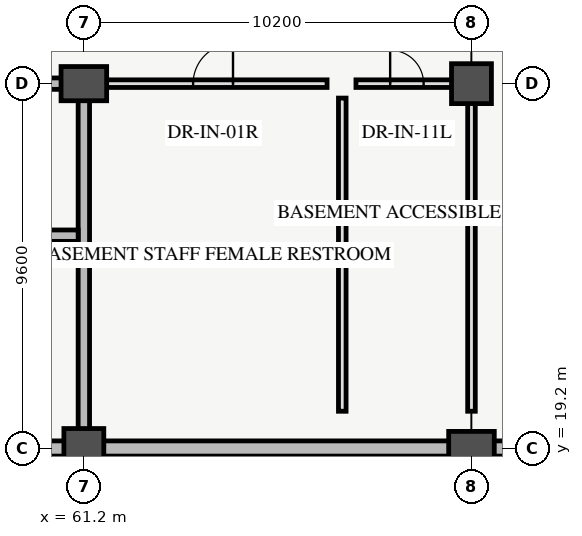
"""IFC4 building model, lengths in metres.
Left out: names, types, materials, properties, quantities, classifications, styles, units other than length and angle.
Written with IfcOpenShell. Run it as: python <this file> out.ifc"""

import sys

from ifc_helpers import new_model, si_unit, direction, frame, frame_2d, origin, origin_2d, place, context, subcontext, project, spatial, rectangle, extrude, element, fill, save


model = new_model("IFC4")
c1 = context("Model", 3, precision=1e-05, world=origin(), true_north=direction((0.0, 1.0)))
c2 = subcontext(c1, "Body", "Model", "MODEL_VIEW")
j1 = project(units=[si_unit("LENGTHUNIT", "METRE"), si_unit("PLANEANGLEUNIT", "RADIAN")], contexts=[c1])
p1 = place(None, origin())
s1 = spatial("IfcSite", under=j1, at=p1, CompositionType="ELEMENT")
p2 = place(p1, origin())
s2 = spatial("IfcBuilding", under=s1, at=p2, CompositionType="ELEMENT")
p3 = place(p2, frame((0.0, 0.0, -4.5)))
s3 = spatial("IfcBuildingStorey", under=s2, at=p3, CompositionType="ELEMENT", Elevation=-4.5)
p4 = place(p3, frame((61.2, 19.2, 0.0), z_axis=(0.0, 0.0, 1.0), x_axis=(1.0, 0.0, 0.0)))
e1 = element("IfcColumn", 1, at=p4, inside=s3, PredefinedType="COLUMN", context=c2, shape_type="SweptSolid", body=[
    extrude(rectangle(XDim=1.05, YDim=1.05, at=origin_2d()), origin(), (0.0, 0.0, 1.0), 4.5),
])
for number, where, z_axis, x_axis in (
    (2, (61.2, 28.8, 0.0), (0.0, 0.0, 1.0), (1.0, 0.0, 0.0)),
    (3, (71.4, 19.2, 0.0), (0.0, 0.0, 1.0), (1.0, 0.0, 0.0)),
):
    element("IfcColumn", number, at=place(p3, frame(where, z_axis=z_axis, x_axis=x_axis)), inside=s3, PredefinedType="COLUMN", context=c2, shape_type="SweptSolid", body=[
        extrude(rectangle(XDim=1.2, YDim=0.9, at=origin_2d()), origin(), (0.0, 0.0, 1.0), 4.5),
    ])
p5 = place(p3, frame((71.4, 28.8, 0.0), z_axis=(0.0, 0.0, 1.0), x_axis=(1.0, 0.0, 0.0)))
e4 = element("IfcColumn", 4, at=p5, inside=s3, PredefinedType="COLUMN", context=c2, shape_type="SweptSolid", body=[
    extrude(rectangle(XDim=1.05, YDim=1.05, at=origin_2d()), origin(), (0.0, 0.0, 1.0), 4.5),
])
p6 = place(p3, frame((0.0, 19.2, 0.0), z_axis=(0.0, 0.0, 1.0), x_axis=(1.0, 0.0, 0.0)))
e5 = element("IfcWall", 5, at=p6, inside=s3, PredefinedType="SOLIDWALL", context=c2, shape_type="SweptSolid", body=[
    extrude(rectangle(XDim=102.0, YDim=0.4, at=frame_2d((51.0, 0.0))), origin(), (0.0, 0.0, 1.0), 4.1),
])
p7 = place(p3, frame((51.0, 28.8, 0.0), z_axis=(0.0, 0.0, 1.0), x_axis=(1.0, 0.0, 0.0)))
e6 = element("IfcWall", 6, at=p7, inside=s3, PredefinedType="SHEAR", context=c2, shape_type="SweptSolid", body=[
    extrude(rectangle(XDim=10.2, YDim=0.3, at=frame_2d((5.1, 0.0))), origin(), (0.0, 0.0, 1.0), 4.5),
])
p8 = place(p3, frame((61.2, 19.2, 0.0), z_axis=(0.0, 0.0, 1.0), x_axis=(0.0, 1.0, 0.0)))
e7 = element("IfcWall", 7, at=p8, inside=s3, PredefinedType="SHEAR", context=c2, shape_type="SweptSolid", body=[
    extrude(rectangle(XDim=9.6, YDim=0.3, at=frame_2d((4.8, 0.0))), origin(), (0.0, 0.0, 1.0), 4.5),
])
p9 = place(p3, frame((51.15, 24.8, 0.0), z_axis=(0.0, 0.0, 1.0), x_axis=(1.0, 0.0, 0.0)))
e8 = element("IfcWall", 8, at=p9, inside=s3, PredefinedType="SHEAR", context=c2, shape_type="SweptSolid", body=[
    extrude(rectangle(XDim=9.9, YDim=0.3, at=frame_2d((4.95, 0.0))), origin(), (0.0, 0.0, 1.0), 4.5),
])
p10 = place(p3, frame((61.6, 28.8, 0.0), z_axis=(0.0, 0.0, 1.0), x_axis=(1.0, 0.0, 0.0)))
e9 = element("IfcWall", 9, at=p10, inside=s3, PredefinedType="PARTITIONING", context=c2, shape_type="SweptSolid", body=[
    extrude(rectangle(XDim=6.0, YDim=0.2, at=frame_2d((3.0, 0.0))), origin(), (0.0, 0.0, 1.0), 2.75),
])
p11 = place(p10, frame((2.475, 0.0, 0.0)))
e10 = element("IfcOpeningElement", 10, at=p11, cuts=e9, PredefinedType="OPENING", context=c2, shape_type="SweptSolid", body=[
    extrude(rectangle(XDim=1.05, YDim=2.15, at=frame_2d((0.525, 1.075))), frame((0.0, 0.11, 0.0), z_axis=(0.0, -1.0, 0.0), x_axis=(1.0, 0.0, 0.0)), (0.0, 0.0, 1.0), 0.22),
])
p12 = place(p3, frame((68.36, 28.8, 0.0), z_axis=(0.0, 0.0, 1.0), x_axis=(1.0, 0.0, 0.0)))
e11 = element("IfcWall", 11, at=p12, inside=s3, PredefinedType="PARTITIONING", context=c2, shape_type="SweptSolid", body=[
    extrude(rectangle(XDim=2.68, YDim=0.2, at=frame_2d((1.34, 0.0))), origin(), (0.0, 0.0, 1.0), 2.75),
])
p13 = place(p12, frame((0.9, 0.0, 0.0)))
e12 = element("IfcOpeningElement", 12, at=p13, cuts=e11, PredefinedType="OPENING", context=c2, shape_type="SweptSolid", body=[
    extrude(rectangle(XDim=0.88, YDim=2.08, at=frame_2d((0.44, 1.04))), frame((0.0, 0.11, 0.0), z_axis=(0.0, -1.0, 0.0), x_axis=(1.0, 0.0, 0.0)), (0.0, 0.0, 1.0), 0.22),
])
for number, where, z_axis, x_axis in (
    (13, (68.0, 20.18, 0.0), (0.0, 0.0, 1.0), (0.0, 1.0, 0.0)),
    (14, (71.4, 20.18, 0.0), (0.0, 0.0, 1.0), (0.0, 1.0, 0.0)),
):
    element("IfcWall", number, at=place(p3, frame(where, z_axis=z_axis, x_axis=x_axis)), inside=s3, PredefinedType="PARTITIONING", context=c2, shape_type="SweptSolid", body=[
        extrude(rectangle(XDim=8.24, YDim=0.2, at=frame_2d((4.12, 0.0))), origin(), (0.0, 0.0, 1.0), 2.75),
    ])
p14 = place(p11, origin())
e15 = element("IfcDoor", 15, at=p14, inside=s3, OperationType="SINGLE_SWING_RIGHT", PredefinedType="DOOR", context=c2, shape_type="SweptSolid", body=[
    extrude(rectangle(XDim=1.05, YDim=2.15, at=frame_2d((0.525, 1.075))), frame((0.0, 0.025, 0.0), z_axis=(0.0, -1.0, 0.0), x_axis=(1.0, 0.0, 0.0)), (0.0, 0.0, 1.0), 0.05),
])
fill(e10, e15)
p15 = place(p13, origin())
e16 = element("IfcDoor", 16, at=p15, inside=s3, OperationType="SINGLE_SWING_LEFT", PredefinedType="DOOR", context=c2, shape_type="SweptSolid", body=[
    extrude(rectangle(XDim=0.88, YDim=2.08, at=frame_2d((0.44, 1.04))), frame((0.0, 0.025, 0.0), z_axis=(0.0, -1.0, 0.0), x_axis=(1.0, 0.0, 0.0)), (0.0, 0.0, 1.0), 0.05),
])
fill(e12, e16)
save(model, sys.argv[1])
